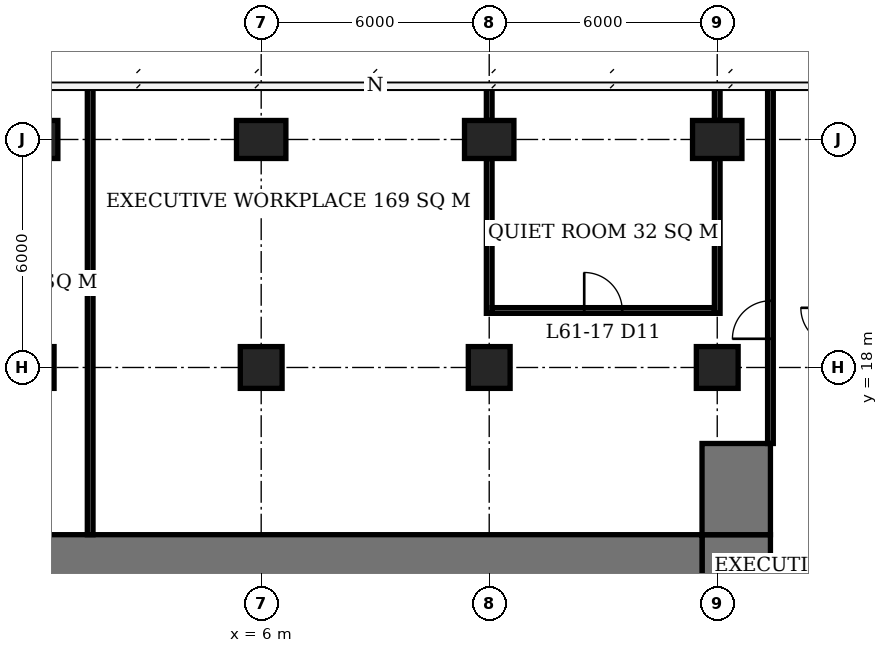
"""IFC4 building model, lengths in metres.
Left out: names, types, materials, properties, quantities, classifications, styles, units other than length and angle.
Written with IfcOpenShell. Run it as: python <this file> out.ifc"""

import sys

from ifc_helpers import new_model, si_unit, direction, frame, frame_2d, origin, origin_2d, place, context, subcontext, project, spatial, rectangle, extrude, element, fill, save


model = new_model("IFC4")
c1 = context("Model", 3, precision=1e-05, world=origin(), true_north=direction((0.0, 1.0)))
c2 = subcontext(c1, "Body", "Model", "MODEL_VIEW")
j1 = project(units=[si_unit("LENGTHUNIT", "METRE"), si_unit("PLANEANGLEUNIT", "RADIAN")], contexts=[c1])
p1 = place(None, origin())
s1 = spatial("IfcSite", under=j1, at=p1, CompositionType="ELEMENT")
p2 = place(p1, origin())
s2 = spatial("IfcBuilding", under=s1, at=p2, CompositionType="ELEMENT")
p3 = place(p2, frame((0.0, 0.0, 248.9)))
s3 = spatial("IfcBuildingStorey", under=s2, at=p3, CompositionType="ELEMENT", Elevation=248.9)
p4 = place(p3, frame((0.0, 18.0, 0.0), z_axis=(0.0, 0.0, 1.0), x_axis=(1.0, 0.0, 0.0)))
e1 = element("IfcColumn", 1, at=p4, inside=s3, PredefinedType="COLUMN", context=c2, shape_type="SweptSolid", body=[
    extrude(rectangle(XDim=1.1, YDim=1.1, at=origin_2d()), origin(), (0.0, 0.0, 1.0), 3.9),
])
p5 = place(p3, frame((0.0, 24.0, 0.0), z_axis=(0.0, 0.0, 1.0), x_axis=(1.0, 0.0, 0.0)))
e2 = element("IfcColumn", 2, at=p5, inside=s3, PredefinedType="COLUMN", context=c2, shape_type="SweptSolid", body=[
    extrude(rectangle(XDim=1.3, YDim=1.0, at=origin_2d()), origin(), (0.0, 0.0, 1.0), 3.9),
])
p6 = place(p3, frame((6.0, 18.0, 0.0), z_axis=(0.0, 0.0, 1.0), x_axis=(1.0, 0.0, 0.0)))
e3 = element("IfcColumn", 3, at=p6, inside=s3, PredefinedType="COLUMN", context=c2, shape_type="SweptSolid", body=[
    extrude(rectangle(XDim=1.1, YDim=1.1, at=origin_2d()), origin(), (0.0, 0.0, 1.0), 3.9),
])
p7 = place(p3, frame((6.0, 24.0, 0.0), z_axis=(0.0, 0.0, 1.0), x_axis=(1.0, 0.0, 0.0)))
e4 = element("IfcColumn", 4, at=p7, inside=s3, PredefinedType="COLUMN", context=c2, shape_type="SweptSolid", body=[
    extrude(rectangle(XDim=1.3, YDim=1.0, at=origin_2d()), origin(), (0.0, 0.0, 1.0), 3.9),
])
p8 = place(p3, frame((12.0, 18.0, 0.0), z_axis=(0.0, 0.0, 1.0), x_axis=(1.0, 0.0, 0.0)))
e5 = element("IfcColumn", 5, at=p8, inside=s3, PredefinedType="COLUMN", context=c2, shape_type="SweptSolid", body=[
    extrude(rectangle(XDim=1.1, YDim=1.1, at=origin_2d()), origin(), (0.0, 0.0, 1.0), 3.9),
])
p9 = place(p3, frame((12.0, 24.0, 0.0), z_axis=(0.0, 0.0, 1.0), x_axis=(1.0, 0.0, 0.0)))
e6 = element("IfcColumn", 6, at=p9, inside=s3, PredefinedType="COLUMN", context=c2, shape_type="SweptSolid", body=[
    extrude(rectangle(XDim=1.3, YDim=1.0, at=origin_2d()), origin(), (0.0, 0.0, 1.0), 3.9),
])
p10 = place(p3, frame((18.0, 18.0, 0.0), z_axis=(0.0, 0.0, 1.0), x_axis=(1.0, 0.0, 0.0)))
e7 = element("IfcColumn", 7, at=p10, inside=s3, PredefinedType="COLUMN", context=c2, shape_type="SweptSolid", body=[
    extrude(rectangle(XDim=1.1, YDim=1.1, at=origin_2d()), origin(), (0.0, 0.0, 1.0), 3.9),
])
p11 = place(p3, frame((18.0, 24.0, 0.0), z_axis=(0.0, 0.0, 1.0), x_axis=(1.0, 0.0, 0.0)))
e8 = element("IfcColumn", 8, at=p11, inside=s3, PredefinedType="COLUMN", context=c2, shape_type="SweptSolid", body=[
    extrude(rectangle(XDim=1.3, YDim=1.0, at=origin_2d()), origin(), (0.0, 0.0, 1.0), 3.9),
])
p12 = place(p3, frame((-5.6, 12.6, 0.0), z_axis=(0.0, 0.0, 1.0), x_axis=(1.0, 0.0, 0.0)))
e9 = element("IfcWall", 9, at=p12, inside=s3, PredefinedType="SHEAR", context=c2, shape_type="SweptSolid", body=[
    extrude(rectangle(XDim=23.2, YDim=2.0, at=frame_2d((11.6, 0.0))), origin(), (0.0, 0.0, 1.0), 3.9),
])
p13 = place(p3, frame((18.5, -7.6, 0.0), z_axis=(0.0, 0.0, 1.0), x_axis=(0.0, 1.0, 0.0)))
e10 = element("IfcWall", 10, at=p13, inside=s3, PredefinedType="SHEAR", context=c2, shape_type="SweptSolid", body=[
    extrude(rectangle(XDim=21.2, YDim=1.8, at=frame_2d((10.6, 0.0))), origin(), (0.0, 0.0, 1.0), 3.9),
])
p14 = place(p13, frame((9.2, 0.0, 0.0)))
e11 = element("IfcOpeningElement", 11, at=p14, cuts=e10, PredefinedType="OPENING", context=c2, shape_type="SweptSolid", body=[
    extrude(rectangle(XDim=1.8, YDim=2.4, at=frame_2d((0.9, 1.2))), frame((0.0, 0.91, 0.0), z_axis=(0.0, -1.0, 0.0), x_axis=(1.0, 0.0, 0.0)), (0.0, 0.0, 1.0), 1.82),
])
p15 = place(p3, frame((18.5, 13.6, 0.0), z_axis=(0.0, 0.0, 1.0), x_axis=(0.0, 1.0, 0.0)))
e12 = element("IfcWall", 12, at=p15, inside=s3, PredefinedType="SHEAR", context=c2, shape_type="SweptSolid", body=[
    extrude(rectangle(XDim=2.4, YDim=1.8, at=frame_2d((1.2, 0.0))), origin(), (0.0, 0.0, 1.0), 3.9),
])
p16 = place(p3, frame((12.075, 19.5, 0.0), z_axis=(0.0, 0.0, 1.0), x_axis=(1.0, 0.0, 0.0)))
e13 = element("IfcWall", 13, at=p16, inside=s3, PredefinedType="PARTITIONING", context=c2, shape_type="SweptSolid", body=[
    extrude(rectangle(XDim=5.85, YDim=0.15, at=frame_2d((2.925, 0.0))), origin(), (0.0, 0.0, 1.0), 3.65),
])
p17 = place(p16, frame((2.425, 0.0, 0.0)))
e14 = element("IfcOpeningElement", 14, at=p17, cuts=e13, PredefinedType="OPENING", context=c2, shape_type="SweptSolid", body=[
    extrude(rectangle(XDim=1.0, YDim=2.4, at=frame_2d((0.5, 1.2))), frame((0.0, 0.085, 0.0), z_axis=(0.0, -1.0, 0.0), x_axis=(1.0, 0.0, 0.0)), (0.0, 0.0, 1.0), 0.17),
])
p18 = place(p3, frame((12.0, 19.425, 0.0), z_axis=(0.0, 0.0, 1.0), x_axis=(0.0, 1.0, 0.0)))
e15 = element("IfcWall", 15, at=p18, inside=s3, PredefinedType="PARTITIONING", context=c2, shape_type="SweptSolid", body=[
    extrude(rectangle(XDim=4.075, YDim=0.15, at=frame_2d((2.038, 0.0))), origin(), (0.0, 0.0, 1.0), 3.65),
])
p19 = place(p3, frame((12.0, 24.5, 0.0), z_axis=(0.0, 0.0, 1.0), x_axis=(0.0, 1.0, 0.0)))
e16 = element("IfcWall", 16, at=p19, inside=s3, PredefinedType="PARTITIONING", context=c2, shape_type="SweptSolid", body=[
    extrude(rectangle(XDim=0.85, YDim=0.15, at=frame_2d((0.425, 0.0))), origin(), (0.0, 0.0, 1.0), 3.65),
])
p20 = place(p3, frame((18.0, 19.425, 0.0), z_axis=(0.0, 0.0, 1.0), x_axis=(0.0, 1.0, 0.0)))
e17 = element("IfcWall", 17, at=p20, inside=s3, PredefinedType="PARTITIONING", context=c2, shape_type="SweptSolid", body=[
    extrude(rectangle(XDim=4.075, YDim=0.15, at=frame_2d((2.038, 0.0))), origin(), (0.0, 0.0, 1.0), 3.65),
])
p21 = place(p3, frame((18.0, 24.5, 0.0), z_axis=(0.0, 0.0, 1.0), x_axis=(0.0, 1.0, 0.0)))
e18 = element("IfcWall", 18, at=p21, inside=s3, PredefinedType="PARTITIONING", context=c2, shape_type="SweptSolid", body=[
    extrude(rectangle(XDim=0.875, YDim=0.15, at=frame_2d((0.438, 0.0))), origin(), (0.0, 0.0, 1.0), 3.65),
])
p22 = place(p3, frame((1.5, 13.6, 0.0), z_axis=(0.0, 0.0, 1.0), x_axis=(0.0, 1.0, 0.0)))
e19 = element("IfcWall", 19, at=p22, inside=s3, PredefinedType="PARTITIONING", context=c2, shape_type="SweptSolid", body=[
    extrude(rectangle(XDim=11.775, YDim=0.15, at=frame_2d((5.887, 0.0))), origin(), (0.0, 0.0, 1.0), 3.65),
])
p23 = place(p3, frame((19.4, 16.0, 0.0), z_axis=(0.0, 0.0, 1.0), x_axis=(0.0, 1.0, 0.0)))
e20 = element("IfcWall", 20, at=p23, inside=s3, PredefinedType="PARTITIONING", context=c2, shape_type="SweptSolid", body=[
    extrude(rectangle(XDim=9.375, YDim=0.15, at=frame_2d((4.688, 0.0))), origin(), (0.0, 0.0, 1.0), 3.65),
])
p24 = place(p23, frame((2.755, 0.0, 0.0)))
e21 = element("IfcOpeningElement", 21, at=p24, cuts=e20, PredefinedType="OPENING", context=c2, shape_type="SweptSolid", body=[
    extrude(rectangle(XDim=1.0, YDim=2.4, at=frame_2d((0.5, 1.2))), frame((0.0, 0.085, 0.0), z_axis=(0.0, -1.0, 0.0), x_axis=(1.0, 0.0, 0.0)), (0.0, 0.0, 1.0), 0.17),
])
p25 = place(p17, origin())
e22 = element("IfcDoor", 22, at=p25, inside=s3, OperationType="SINGLE_SWING_LEFT", PredefinedType="DOOR", context=c2, shape_type="SweptSolid", body=[
    extrude(rectangle(XDim=1.0, YDim=2.4, at=frame_2d((0.5, 1.2))), frame((0.0, 0.025, 0.0), z_axis=(0.0, -1.0, 0.0), x_axis=(1.0, 0.0, 0.0)), (0.0, 0.0, 1.0), 0.05),
])
fill(e14, e22)
p26 = place(p24, origin())
e23 = element("IfcDoor", 23, at=p26, inside=s3, OperationType="SINGLE_SWING_LEFT", PredefinedType="DOOR", context=c2, shape_type="SweptSolid", body=[
    extrude(rectangle(XDim=1.0, YDim=2.4, at=frame_2d((0.5, 1.2))), frame((0.0, 0.025, 0.0), z_axis=(0.0, -1.0, 0.0), x_axis=(1.0, 0.0, 0.0)), (0.0, 0.0, 1.0), 0.05),
])
fill(e21, e23)
save(model, sys.argv[1])
